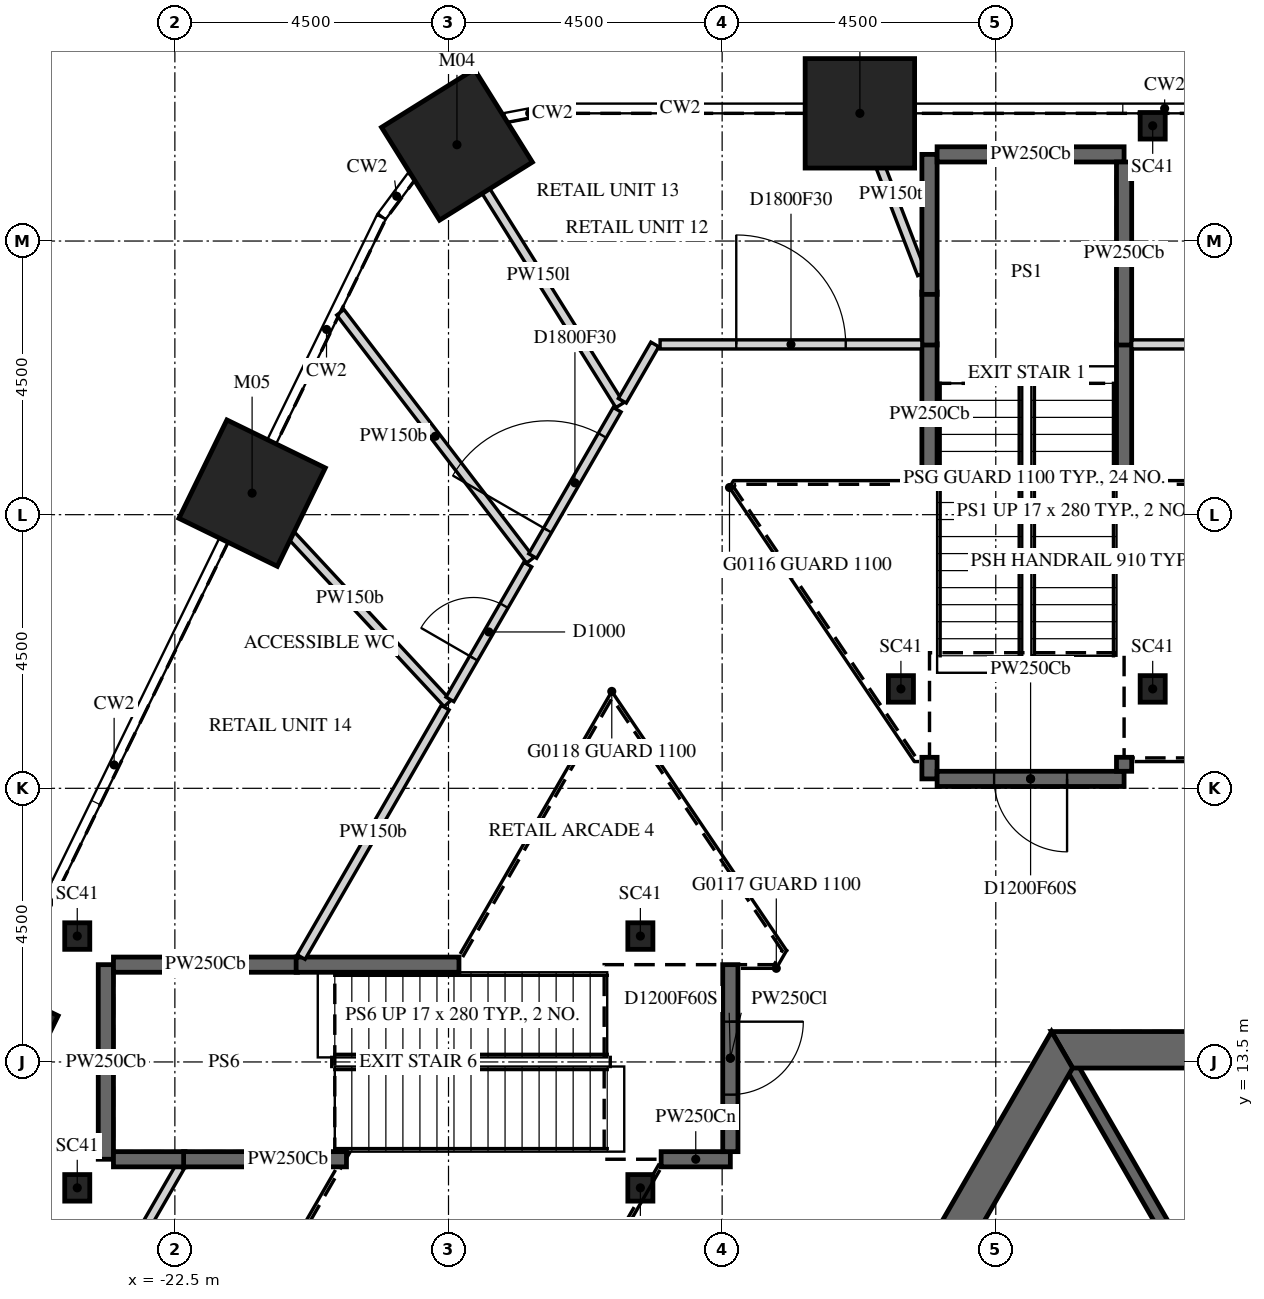
"""IFC4 building model, lengths in metres.
Left out: names, types, materials, properties, quantities, classifications, styles, units other than length and angle.
Written with IfcOpenShell. Run it as: python <this file> out.ifc"""

import sys

from ifc_helpers import new_model, si_unit, direction, frame, frame_2d, origin, origin_2d, place, context, subcontext, project, spatial, polyline, rectangle, i_section, outline, extrude, element, fill, save


model = new_model("IFC4")
c1 = context("Model", 3, precision=1e-05, world=origin(), true_north=direction((0.0, 1.0)))
c2 = subcontext(c1, "Body", "Model", "MODEL_VIEW")
j1 = project(units=[si_unit("LENGTHUNIT", "METRE"), si_unit("PLANEANGLEUNIT", "RADIAN")], contexts=[c1])
p1 = place(None, origin())
s1 = spatial("IfcSite", under=j1, at=p1, CompositionType="ELEMENT")
p2 = place(p1, origin())
s2 = spatial("IfcBuilding", under=s1, at=p2, CompositionType="ELEMENT")
p3 = place(p2, frame((0.0, 0.0, 9.0)))
s3 = spatial("IfcBuildingStorey", under=s2, at=p3, CompositionType="ELEMENT", Elevation=9.0)
for number, where, z_axis, x_axis in (
    (1, (-11.235, 29.1, -0.25), (0.0, 0.0, 1.0), (1.0, 0.0, 0.0)),
    (2, (-17.861, 28.583, -0.25), (0.0, 0.0, 1.0), (0.848, 0.53, 0.0)),
    (3, (-21.23, 22.854, -0.25), (0.0, 0.0, 1.0), (0.438, 0.899, 0.0)),
    (4, (-25.624, 13.845, -0.25), (0.0, 0.0, 1.0), (0.438, 0.899, 0.0)),
):
    element("IfcColumn", number, at=place(p3, frame(where, z_axis=z_axis, x_axis=x_axis)), inside=s3, PredefinedType="COLUMN", context=c2, shape_type="SweptSolid", body=[
        extrude(rectangle(XDim=1.8, YDim=1.8, at=origin_2d()), origin(), (0.0, 0.0, 1.0), 6.0),
    ])
for number, where, z_axis, x_axis in (
    (5, (-6.419, 28.895, -0.25), (0.0, 0.0, 1.0), (1.0, 0.0, 0.0)),
    (6, (-6.419, 19.635, -0.25), (0.0, 0.0, 1.0), (1.0, 0.0, 0.0)),
    (7, (-10.56, 19.635, -0.25), (0.0, 0.0, 1.0), (1.0, 0.0, 0.0)),
    (8, (-24.105, 11.43, -0.25), (0.0, 0.0, 1.0), (1.0, 0.0, 0.0)),
    (9, (-24.105, 15.57, -0.25), (0.0, 0.0, 1.0), (1.0, 0.0, 0.0)),
    (10, (-14.845, 15.57, -0.25), (0.0, 0.0, 1.0), (1.0, 0.0, 0.0)),
    (11, (-14.845, 11.43, -0.25), (0.0, 0.0, 1.0), (1.0, 0.0, 0.0)),
):
    element("IfcColumn", number, at=place(p3, frame(where, z_axis=z_axis, x_axis=x_axis)), inside=s3, PredefinedType="COLUMN", context=c2, shape_type="SweptSolid", body=[
        extrude(i_section(OverallWidth=0.412, OverallDepth=0.437, WebThickness=0.036, FlangeThickness=0.058, FilletRadius=0.015, at=origin_2d()), origin(), (0.0, 0.0, 1.0), 6.0),
    ])
p4 = place(p3, frame((-7.91, 13.7, -0.25), z_axis=(0.0, 0.0, 1.0), x_axis=(-0.499999880136, -0.866025472988, 0.0)))
e12 = element("IfcWall", 12, at=p4, inside=s3, PredefinedType="SHEAR", context=c2, shape_type="SweptSolid", body=[
    extrude(outline(polyline([(-0.173, -0.3), (15.993, -0.3), (15.646, 0.3), (0.173, 0.3), (-0.173, -0.3)])), origin(), (0.0, 0.0, 1.0), 6.0),
])
p5 = place(p4, frame((7.039, 0.0, 0.25)))
e13 = element("IfcOpeningElement", 13, at=p5, cuts=e12, PredefinedType="OPENING", context=c2, shape_type="SweptSolid", body=[
    extrude(rectangle(XDim=1.8, YDim=2.4, at=frame_2d((0.9, 1.2))), frame((0.0, 0.31, 0.0), z_axis=(0.0, -1.0, 0.0), x_axis=(1.0, 0.0, 0.0)), (0.0, 0.0, 1.0), 0.62),
])
p6 = place(p3, frame((7.91, 13.7, -0.25), z_axis=(0.0, 0.0, 1.0), x_axis=(-1.0, 0.0, 0.0)))
e14 = element("IfcWall", 14, at=p6, inside=s3, PredefinedType="SHEAR", context=c2, shape_type="SweptSolid", body=[
    extrude(outline(polyline([(-0.173, -0.3), (15.993, -0.3), (15.646, 0.3), (0.173, 0.3), (-0.173, -0.3)])), origin(), (0.0, 0.0, 1.0), 6.0),
])
p7 = place(p6, frame((7.31, 0.0, 0.25)))
e15 = element("IfcOpeningElement", 15, at=p7, cuts=e14, PredefinedType="OPENING", context=c2, shape_type="SweptSolid", body=[
    extrude(rectangle(XDim=1.2, YDim=2.4, at=frame_2d((0.6, 1.2))), frame((0.0, 0.31, 0.0), z_axis=(0.0, -1.0, 0.0), x_axis=(1.0, 0.0, 0.0)), (0.0, 0.0, 1.0), 0.62),
])
p8 = place(p3, frame((-5.773, 10.0, -0.25), z_axis=(0.0, 0.0, 1.0), x_axis=(-0.500038251005, 0.86600331843, 0.0)))
e16 = element("IfcWall", 16, at=p8, inside=s3, PredefinedType="SHEAR", context=c2, shape_type="SweptSolid", body=[
    extrude(rectangle(XDim=3.926, YDim=0.2, at=frame_2d((1.963, 0.0))), origin(), (0.0, 0.0, 1.0), 6.0),
])
p9 = place(p3, frame((-23.635, 11.9, 0.0), z_axis=(0.0, 0.0, 1.0), x_axis=(0.0, 1.0, 0.0)))
e17 = element("IfcWall", 17, at=p9, inside=s3, PredefinedType="PARTITIONING", context=c2, shape_type="SweptSolid", body=[
    extrude(rectangle(XDim=3.2, YDim=0.25, at=frame_2d((1.6, 0.0))), origin(), (0.0, 0.0, 1.0), 5.75),
])
p10 = place(p3, frame((-23.51, 15.1, 0.0), z_axis=(0.0, 0.0, 1.0), x_axis=(1.0, 0.0, 0.0)))
e18 = element("IfcWall", 18, at=p10, inside=s3, PredefinedType="PARTITIONING", context=c2, shape_type="SweptSolid", body=[
    extrude(rectangle(XDim=3.026, YDim=0.25, at=frame_2d((1.513, 0.0))), origin(), (0.0, 0.0, 1.0), 5.75),
])
p11 = place(p3, frame((-26.688, 4.375, 0.0), z_axis=(0.0, 0.0, 1.0), x_axis=(0.500057174496, 0.865992391557, 0.0)))
e19 = element("IfcWall", 19, at=p11, inside=s3, PredefinedType="PARTITIONING", context=c2, shape_type="SweptSolid", body=[
    extrude(rectangle(XDim=8.544, YDim=0.15, at=frame_2d((4.272, 0.0))), origin(), (0.0, 0.0, 1.0), 5.75),
])
p12 = place(p11, frame((3.372, 0.0, 0.0)))
e20 = element("IfcOpeningElement", 20, at=p12, cuts=e19, PredefinedType="OPENING", context=c2, shape_type="SweptSolid", body=[
    extrude(rectangle(XDim=1.8, YDim=2.1, at=frame_2d((0.9, 1.05))), frame((0.0, 0.085, 0.0), z_axis=(0.0, -1.0, 0.0), x_axis=(1.0, 0.0, 0.0)), (0.0, 0.0, 1.0), 0.17),
])
p13 = place(p3, frame((-22.333, 11.9, 0.0), z_axis=(0.0, 0.0, 1.0), x_axis=(-1.0, 0.0, 0.0)))
e21 = element("IfcWall", 21, at=p13, inside=s3, PredefinedType="PARTITIONING", context=c2, shape_type="SweptSolid", body=[
    extrude(rectangle(XDim=1.177, YDim=0.25, at=frame_2d((0.588, 0.0))), origin(), (0.0, 0.0, 1.0), 5.75),
])
p14 = place(p3, frame((-21.23, 22.854, 0.0), z_axis=(0.0, 0.0, 1.0), x_axis=(0.680673196445, -0.732587195931, 0.0)))
e22 = element("IfcWall", 22, at=p14, inside=s3, PredefinedType="PARTITIONING", context=c2, shape_type="SweptSolid", body=[
    extrude(rectangle(XDim=4.722, YDim=0.15, at=frame_2d((2.361, 0.0))), origin(), (0.0, 0.0, 1.0), 5.75),
])
p15 = place(p3, frame((-20.506, 15.1, 0.0), z_axis=(0.0, 0.0, 1.0), x_axis=(1.0, 0.0, 0.0)))
e23 = element("IfcWall", 23, at=p15, inside=s3, PredefinedType="PARTITIONING", context=c2, shape_type="SweptSolid", body=[
    extrude(rectangle(XDim=2.678, YDim=0.25, at=frame_2d((1.339, 0.0))), origin(), (0.0, 0.0, 1.0), 5.75),
])
p16 = place(p3, frame((-19.779, 25.828, 0.0), z_axis=(0.0, 0.0, 1.0), x_axis=(0.608023337324, -0.793919152855, 0.0)))
e24 = element("IfcWall", 24, at=p16, inside=s3, PredefinedType="PARTITIONING", context=c2, shape_type="SweptSolid", body=[
    extrude(rectangle(XDim=5.136, YDim=0.15, at=frame_2d((2.568, 0.0))), origin(), (0.0, 0.0, 1.0), 5.75),
])
p17 = place(p3, frame((-19.678, 11.9, 0.0), z_axis=(0.0, 0.0, 1.0), x_axis=(-1.0, 0.0, 0.0)))
e25 = element("IfcWall", 25, at=p17, inside=s3, PredefinedType="PARTITIONING", context=c2, shape_type="SweptSolid", body=[
    extrude(rectangle(XDim=2.678, YDim=0.25, at=frame_2d((1.339, 0.0))), origin(), (0.0, 0.0, 1.0), 5.75),
])
p18 = place(p3, frame((-18.055, 19.327, 0.0), z_axis=(0.0, 0.0, 1.0), x_axis=(-0.500052601127, -0.865995032379, 0.0)))
e26 = element("IfcWall", 26, at=p18, inside=s3, PredefinedType="PARTITIONING", context=c2, shape_type="SweptSolid", body=[
    extrude(rectangle(XDim=4.737, YDim=0.15, at=frame_2d((2.368, 0.0))), origin(), (0.0, 0.0, 1.0), 5.75),
])
p19 = place(p3, frame((-17.861, 28.584, 0.0), z_axis=(0.0, 0.0, 1.0), x_axis=(0.529933774968, -0.84803902867, 0.0)))
e27 = element("IfcWall", 27, at=p19, inside=s3, PredefinedType="PARTITIONING", context=c2, shape_type="SweptSolid", body=[
    extrude(rectangle(XDim=5.052, YDim=0.15, at=frame_2d((2.526, 0.0))), origin(), (0.0, 0.0, 1.0), 4.988),
])
p20 = place(p3, frame((-17.977, 19.463, 0.0), z_axis=(0.0, 0.0, 1.0), x_axis=(0.500118698802, 0.865956862152, 0.0)))
e28 = element("IfcWall", 28, at=p20, inside=s3, PredefinedType="PARTITIONING", context=c2, shape_type="SweptSolid", body=[
    extrude(rectangle(XDim=2.56, YDim=0.15, at=frame_2d((1.28, 0.0))), origin(), (0.0, 0.0, 1.0), 5.75),
])
p21 = place(p20, frame((0.78, 0.0, 0.0)))
e29 = element("IfcOpeningElement", 29, at=p21, cuts=e28, PredefinedType="OPENING", context=c2, shape_type="SweptSolid", body=[
    extrude(rectangle(XDim=1.0, YDim=2.1, at=frame_2d((0.5, 1.05))), frame((0.0, 0.085, 0.0), z_axis=(0.0, -1.0, 0.0), x_axis=(1.0, 0.0, 0.0)), (0.0, 0.0, 1.0), 0.17),
])
p22 = place(p3, frame((-16.615, 21.82, 0.0), z_axis=(0.0, 0.0, 1.0), x_axis=(0.499948134459, 0.866055346298, 0.0)))
e30 = element("IfcWall", 30, at=p22, inside=s3, PredefinedType="PARTITIONING", context=c2, shape_type="SweptSolid", body=[
    extrude(rectangle(XDim=2.778, YDim=0.15, at=frame_2d((1.389, 0.0))), origin(), (0.0, 0.0, 1.0), 5.75),
])
p23 = place(p22, frame((0.489, 0.0, 0.0)))
e31 = element("IfcOpeningElement", 31, at=p23, cuts=e30, PredefinedType="OPENING", context=c2, shape_type="SweptSolid", body=[
    extrude(rectangle(XDim=1.8, YDim=2.1, at=frame_2d((0.9, 1.05))), frame((0.0, 0.085, 0.0), z_axis=(0.0, -1.0, 0.0), x_axis=(1.0, 0.0, 0.0)), (0.0, 0.0, 1.0), 0.17),
])
p24 = place(p3, frame((-14.607, 25.3, 0.0), z_axis=(0.0, 0.0, 1.0), x_axis=(-0.499821239653, -0.866128586522, 0.0)))
e32 = element("IfcWall", 32, at=p24, inside=s3, PredefinedType="PARTITIONING", context=c2, shape_type="SweptSolid", body=[
    extrude(rectangle(XDim=1.07, YDim=0.15, at=frame_2d((0.535, 0.0))), origin(), (0.0, 0.0, 1.0), 5.75),
])
p25 = place(p3, frame((-13.365, 11.9, 0.0), z_axis=(0.0, 0.0, 1.0), x_axis=(-1.0, 0.0, 0.0)))
e33 = element("IfcWall", 33, at=p25, inside=s3, PredefinedType="PARTITIONING", context=c2, shape_type="SweptSolid", body=[
    extrude(rectangle(XDim=1.138, YDim=0.25, at=frame_2d((0.569, 0.0))), origin(), (0.0, 0.0, 1.0), 5.297),
])
p26 = place(p3, frame((-13.365, 15.1, 0.0), z_axis=(0.0, 0.0, 1.0), x_axis=(0.0, -1.0, 0.0)))
e34 = element("IfcWall", 34, at=p26, inside=s3, PredefinedType="PARTITIONING", context=c2, shape_type="SweptSolid", body=[
    extrude(rectangle(XDim=3.075, YDim=0.25, at=frame_2d((1.538, 0.0))), origin(), (0.0, 0.0, 1.0), 4.988),
])
p27 = place(p26, frame((0.938, 0.0, 0.0)))
e35 = element("IfcOpeningElement", 35, at=p27, cuts=e34, PredefinedType="OPENING", context=c2, shape_type="SweptSolid", body=[
    extrude(rectangle(XDim=1.2, YDim=2.1, at=frame_2d((0.6, 1.05))), frame((0.0, 0.135, 0.0), z_axis=(0.0, -1.0, 0.0), x_axis=(1.0, 0.0, 0.0)), (0.0, 0.0, 1.0), 0.27),
])
p28 = place(p3, frame((-11.235, 29.1, 0.0), z_axis=(0.0, 0.0, 1.0), x_axis=(0.360012438309, -0.932947503487, 0.0)))
e36 = element("IfcWall", 36, at=p28, inside=s3, PredefinedType="PARTITIONING", context=c2, shape_type="SweptSolid", body=[
    extrude(rectangle(XDim=2.833, YDim=0.15, at=frame_2d((1.417, 0.0))), origin(), (0.0, 0.0, 1.0), 4.823),
])
p29 = place(p3, frame((-10.09, 18.155, 0.0), z_axis=(0.0, 0.0, 1.0), x_axis=(0.0, 1.0, 0.0)))
e37 = element("IfcWall", 37, at=p29, inside=s3, PredefinedType="PARTITIONING", context=c2, shape_type="SweptSolid", body=[
    extrude(rectangle(XDim=0.355, YDim=0.25, at=frame_2d((0.177, 0.0))), origin(), (0.0, 0.0, 1.0), 5.75),
])
p30 = place(p3, frame((-10.09, 22.99, 0.0), z_axis=(0.0, 0.0, 1.0), x_axis=(0.0, 1.0, 0.0)))
e38 = element("IfcWall", 38, at=p30, inside=s3, PredefinedType="PARTITIONING", context=c2, shape_type="SweptSolid", body=[
    extrude(rectangle(XDim=2.32, YDim=0.25, at=frame_2d((1.16, 0.0))), origin(), (0.0, 0.0, 1.0), 5.75),
])
p31 = place(p3, frame((-10.09, 25.29, 0.0), z_axis=(0.0, 0.0, 1.0), x_axis=(0.0, 1.0, 0.0)))
e39 = element("IfcWall", 39, at=p31, inside=s3, PredefinedType="PARTITIONING", context=c2, shape_type="SweptSolid", body=[
    extrude(rectangle(XDim=0.87, YDim=0.25, at=frame_2d((0.435, 0.0))), origin(), (0.0, 0.0, 1.0), 5.75),
])
p32 = place(p3, frame((-14.521, 25.3, 0.0), z_axis=(0.0, 0.0, 1.0), x_axis=(1.0, 0.0, 0.0)))
e40 = element("IfcWall", 40, at=p32, inside=s3, PredefinedType="PARTITIONING", context=c2, shape_type="SweptSolid", body=[
    extrude(rectangle(XDim=4.305, YDim=0.15, at=frame_2d((2.153, 0.0))), origin(), (0.0, 0.0, 1.0), 5.75),
])
p33 = place(p32, frame((1.253, 0.0, 0.0)))
e41 = element("IfcOpeningElement", 41, at=p33, cuts=e40, PredefinedType="OPENING", context=c2, shape_type="SweptSolid", body=[
    extrude(rectangle(XDim=1.8, YDim=2.1, at=frame_2d((0.9, 1.05))), frame((0.0, 0.085, 0.0), z_axis=(0.0, -1.0, 0.0), x_axis=(1.0, 0.0, 0.0)), (0.0, 0.0, 1.0), 0.17),
])
p34 = place(p3, frame((-10.09, 26.123, 0.0), z_axis=(0.0, 0.0, 1.0), x_axis=(0.0, 1.0, 0.0)))
e42 = element("IfcWall", 42, at=p34, inside=s3, PredefinedType="PARTITIONING", context=c2, shape_type="SweptSolid", body=[
    extrude(rectangle(XDim=2.302, YDim=0.25, at=frame_2d((1.151, 0.0))), origin(), (0.0, 0.0, 1.0), 5.75),
])
p35 = place(p3, frame((-9.965, 28.425, 0.0), z_axis=(0.0, 0.0, 1.0), x_axis=(1.0, 0.0, 0.0)))
e43 = element("IfcWall", 43, at=p35, inside=s3, PredefinedType="PARTITIONING", context=c2, shape_type="SweptSolid", body=[
    extrude(rectangle(XDim=3.075, YDim=0.25, at=frame_2d((1.538, 0.0))), origin(), (0.0, 0.0, 1.0), 5.75),
])
p36 = place(p3, frame((-6.89, 18.155, 0.0), z_axis=(0.0, 0.0, 1.0), x_axis=(-1.0, 0.0, 0.0)))
e44 = element("IfcWall", 44, at=p36, inside=s3, PredefinedType="PARTITIONING", context=c2, shape_type="SweptSolid", body=[
    extrude(rectangle(XDim=3.075, YDim=0.25, at=frame_2d((1.538, 0.0))), origin(), (0.0, 0.0, 1.0), 5.75),
])
p37 = place(p36, frame((0.938, 0.0, 0.0)))
e45 = element("IfcOpeningElement", 45, at=p37, cuts=e44, PredefinedType="OPENING", context=c2, shape_type="SweptSolid", body=[
    extrude(rectangle(XDim=1.2, YDim=2.1, at=frame_2d((0.6, 1.05))), frame((0.0, 0.135, 0.0), z_axis=(0.0, -1.0, 0.0), x_axis=(1.0, 0.0, 0.0)), (0.0, 0.0, 1.0), 0.27),
])
p38 = place(p3, frame((-6.89, 18.51, 0.0), z_axis=(0.0, 0.0, 1.0), x_axis=(0.0, -1.0, 0.0)))
e46 = element("IfcWall", 46, at=p38, inside=s3, PredefinedType="PARTITIONING", context=c2, shape_type="SweptSolid", body=[
    extrude(rectangle(XDim=0.23, YDim=0.25, at=frame_2d((0.115, 0.0))), origin(), (0.0, 0.0, 1.0), 5.75),
])
p39 = place(p3, frame((-6.89, 25.31, 0.0), z_axis=(0.0, 0.0, 1.0), x_axis=(0.0, -1.0, 0.0)))
e47 = element("IfcWall", 47, at=p39, inside=s3, PredefinedType="PARTITIONING", context=c2, shape_type="SweptSolid", body=[
    extrude(rectangle(XDim=2.32, YDim=0.25, at=frame_2d((1.16, 0.0))), origin(), (0.0, 0.0, 1.0), 5.75),
])
p40 = place(p3, frame((-6.89, 28.3, 0.0), z_axis=(0.0, 0.0, 1.0), x_axis=(0.0, -1.0, 0.0)))
e48 = element("IfcWall", 48, at=p40, inside=s3, PredefinedType="PARTITIONING", context=c2, shape_type="SweptSolid", body=[
    extrude(rectangle(XDim=3.01, YDim=0.25, at=frame_2d((1.505, 0.0))), origin(), (0.0, 0.0, 1.0), 5.75),
])
p41 = place(p3, frame((-6.765, 25.3, 0.0), z_axis=(0.0, 0.0, 1.0), x_axis=(1.0, 0.0, 0.0)))
e49 = element("IfcWall", 49, at=p41, inside=s3, PredefinedType="PARTITIONING", context=c2, shape_type="SweptSolid", body=[
    extrude(rectangle(XDim=14.427, YDim=0.15, at=frame_2d((7.213, 0.0))), origin(), (0.0, 0.0, 1.0), 5.75),
])
p42 = place(p41, frame((6.313, 0.0, 0.0)))
e50 = element("IfcOpeningElement", 50, at=p42, cuts=e49, PredefinedType="OPENING", context=c2, shape_type="SweptSolid", body=[
    extrude(rectangle(XDim=1.8, YDim=2.1, at=frame_2d((0.9, 1.05))), frame((0.0, 0.085, 0.0), z_axis=(0.0, -1.0, 0.0), x_axis=(1.0, 0.0, 0.0)), (0.0, 0.0, 1.0), 0.17),
])
p43 = place(p21, origin())
e51 = element("IfcDoor", 51, at=p43, inside=s3, OperationType="SINGLE_SWING_LEFT", PredefinedType="DOOR", context=c2, shape_type="SweptSolid", body=[
    extrude(rectangle(XDim=1.0, YDim=2.1, at=frame_2d((0.5, 1.05))), frame((0.0, 0.025, 0.0), z_axis=(0.0, -1.0, 0.0), x_axis=(1.0, 0.0, 0.0)), (0.0, 0.0, 1.0), 0.05),
])
fill(e29, e51)
p44 = place(p23, origin())
e52 = element("IfcDoor", 52, at=p44, inside=s3, OperationType="DOUBLE_DOOR_SINGLE_SWING", PredefinedType="DOOR", context=c2, shape_type="SweptSolid", body=[
    extrude(rectangle(XDim=1.8, YDim=2.1, at=frame_2d((0.9, 1.05))), frame((0.0, 0.025, 0.0), z_axis=(0.0, -1.0, 0.0), x_axis=(1.0, 0.0, 0.0)), (0.0, 0.0, 1.0), 0.05),
])
fill(e31, e52)
p45 = place(p27, origin())
e53 = element("IfcDoor", 53, at=p45, inside=s3, OperationType="SINGLE_SWING_RIGHT", PredefinedType="DOOR", context=c2, shape_type="SweptSolid", body=[
    extrude(rectangle(XDim=1.2, YDim=2.1, at=frame_2d((0.6, 1.05))), frame((0.0, 0.025, 0.0), z_axis=(0.0, -1.0, 0.0), x_axis=(1.0, 0.0, 0.0)), (0.0, 0.0, 1.0), 0.05),
])
fill(e35, e53)
p46 = place(p33, origin())
e54 = element("IfcDoor", 54, at=p46, inside=s3, OperationType="DOUBLE_DOOR_SINGLE_SWING", PredefinedType="DOOR", context=c2, shape_type="SweptSolid", body=[
    extrude(rectangle(XDim=1.8, YDim=2.1, at=frame_2d((0.9, 1.05))), frame((0.0, 0.025, 0.0), z_axis=(0.0, -1.0, 0.0), x_axis=(1.0, 0.0, 0.0)), (0.0, 0.0, 1.0), 0.05),
])
fill(e41, e54)
p47 = place(p37, origin())
e55 = element("IfcDoor", 55, at=p47, inside=s3, OperationType="SINGLE_SWING_RIGHT", PredefinedType="DOOR", context=c2, shape_type="SweptSolid", body=[
    extrude(rectangle(XDim=1.2, YDim=2.1, at=frame_2d((0.6, 1.05))), frame((0.0, 0.025, 0.0), z_axis=(0.0, -1.0, 0.0), x_axis=(1.0, 0.0, 0.0)), (0.0, 0.0, 1.0), 0.05),
])
fill(e45, e55)
save(model, sys.argv[1])
